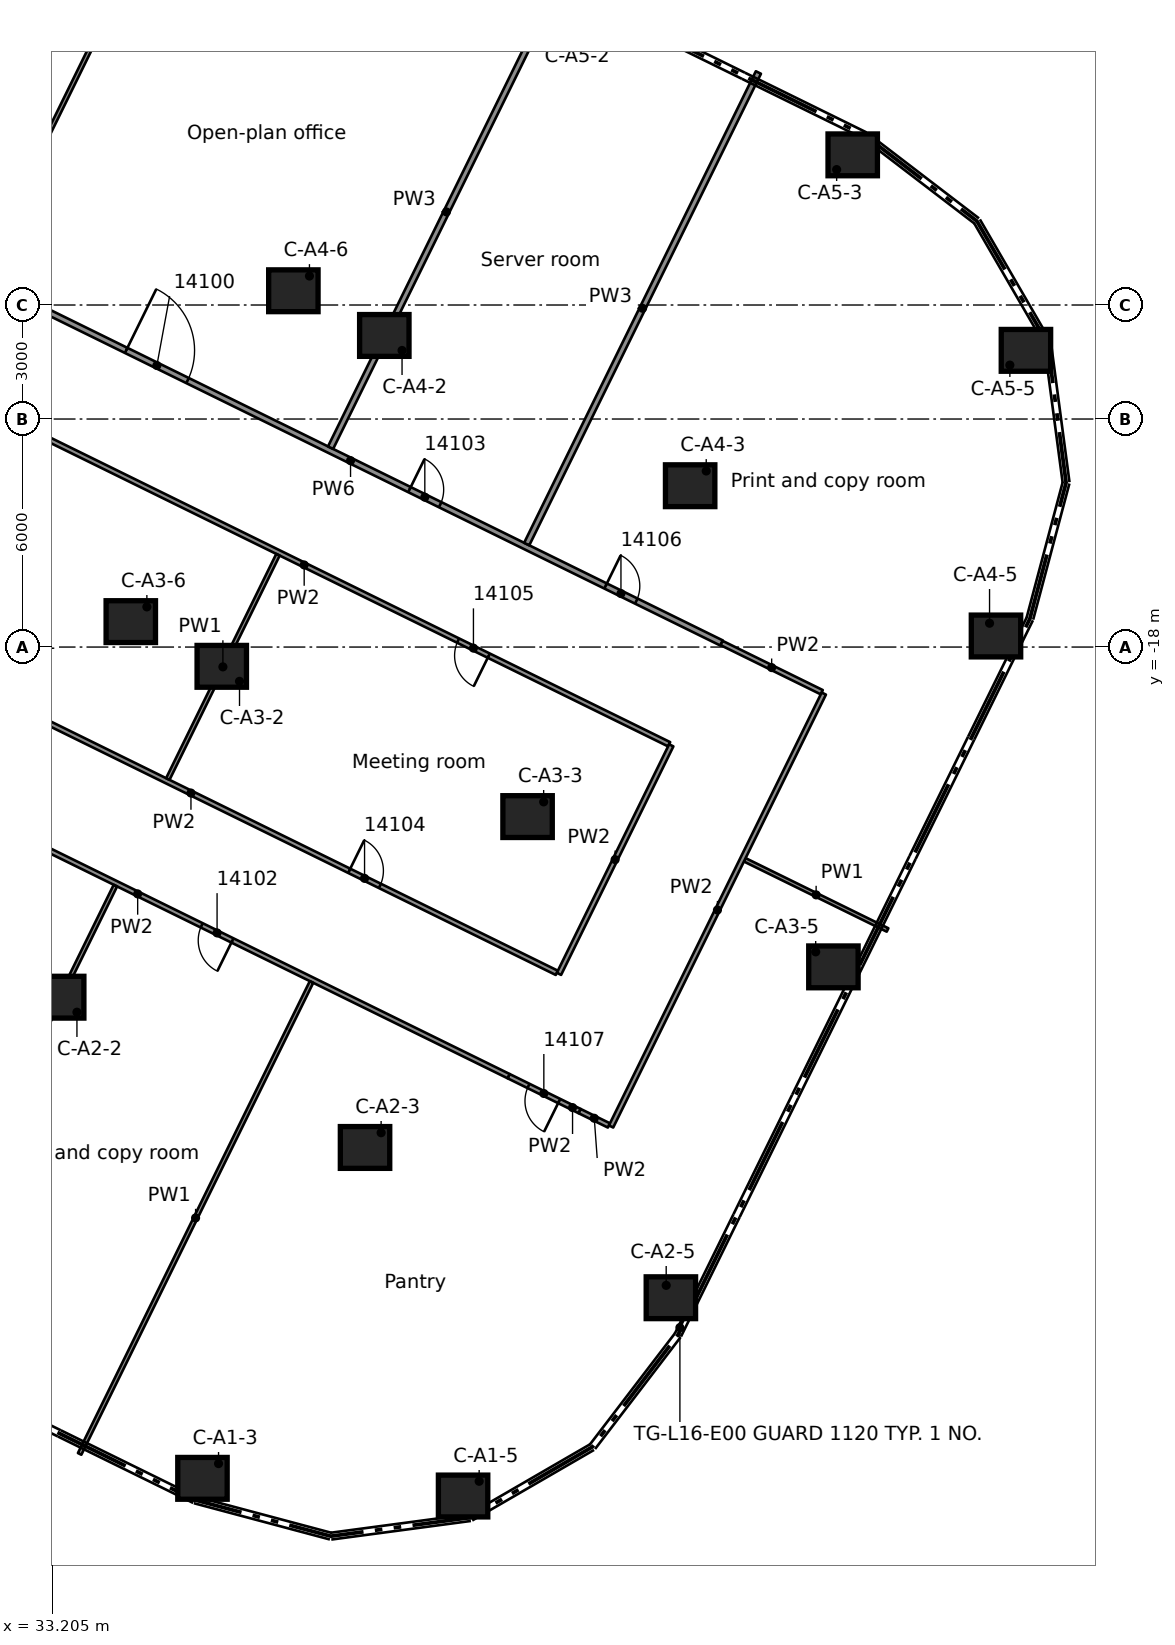
"""IFC4 building model, lengths in metres.
Left out: names, types, materials, properties, quantities, classifications, styles, units other than length and angle.
Written with IfcOpenShell. Run it as: python <this file> out.ifc"""

import sys

from ifc_helpers import new_model, si_unit, direction, frame, frame_2d, origin, origin_2d, place, context, subcontext, project, spatial, rectangle, extrude, element, fill, save


model = new_model("IFC4")
c1 = context("Model", 3, precision=1e-05, world=origin(), true_north=direction((0.0, 1.0)))
c2 = subcontext(c1, "Body", "Model", "MODEL_VIEW")
j1 = project(units=[si_unit("LENGTHUNIT", "METRE"), si_unit("PLANEANGLEUNIT", "RADIAN")], contexts=[c1])
p1 = place(None, origin())
s1 = spatial("IfcSite", under=j1, at=p1, CompositionType="ELEMENT")
p2 = place(p1, origin())
s2 = spatial("IfcBuilding", under=s1, at=p2, CompositionType="ELEMENT")
p3 = place(p2, frame((0.0, 0.0, 69.3)))
s3 = spatial("IfcBuildingStorey", under=s2, at=p3, CompositionType="ELEMENT", Elevation=69.3)
for number, where, z_axis, x_axis in (
    (1, (37.158, -39.873, 0.0), (0.0, 0.0, 1.0), (1.0, 0.0, 0.0)),
    (2, (44.016, -40.338, 0.0), (0.0, 0.0, 1.0), (1.0, 0.0, 0.0)),
    (3, (33.388, -27.213, 0.0), (0.0, 0.0, 1.0), (1.0, 0.0, 0.0)),
    (4, (41.436, -31.167, 0.0), (0.0, 0.0, 1.0), (1.0, 0.0, 0.0)),
    (5, (49.484, -35.121, 0.0), (0.0, 0.0, 1.0), (1.0, 0.0, 0.0)),
    (6, (37.666, -18.507, 0.0), (0.0, 0.0, 1.0), (1.0, 0.0, 0.0)),
    (7, (45.713, -22.461, 0.0), (0.0, 0.0, 1.0), (1.0, 0.0, 0.0)),
    (8, (53.761, -26.415, 0.0), (0.0, 0.0, 1.0), (1.0, 0.0, 0.0)),
    (9, (35.272, -17.331, 0.0), (0.0, 0.0, 1.0), (1.0, 0.0, 0.0)),
    (10, (41.943, -9.801, 0.0), (0.0, 0.0, 1.0), (1.0, 0.0, 0.0)),
    (11, (49.991, -13.755, 0.0), (0.0, 0.0, 1.0), (1.0, 0.0, 0.0)),
    (12, (58.039, -17.709, 0.0), (0.0, 0.0, 1.0), (1.0, 0.0, 0.0)),
    (13, (39.55, -8.625, 0.0), (0.0, 0.0, 1.0), (1.0, 0.0, 0.0)),
    (14, (54.269, -5.049, 0.0), (0.0, 0.0, 1.0), (1.0, 0.0, 0.0)),
    (15, (58.827, -10.193, 0.0), (0.0, 0.0, 1.0), (1.0, 0.0, 0.0)),
):
    element("IfcColumn", number, at=place(p3, frame(where, z_axis=z_axis, x_axis=x_axis)), inside=s3, PredefinedType="COLUMN", context=c2, shape_type="SweptSolid", body=[
        extrude(rectangle(XDim=1.3, YDim=1.1, at=origin_2d()), origin(), (0.0, 0.0, 1.0), 3.5),
    ])
p4 = place(p3, frame((45.217, -29.292, 0.0), z_axis=(0.0, 0.0, 1.0), x_axis=(-0.897531499345, 0.440950346053, 0.0)))
e16 = element("IfcWall", 16, at=p4, inside=s3, PredefinedType="PARTITIONING", context=c2, shape_type="SweptSolid", body=[
    extrude(rectangle(XDim=21.758, YDim=0.125, at=frame_2d((10.879, 0.0))), origin(), (0.0, 0.0, 1.0), 3.03),
])
p5 = place(p4, frame((8.101, 0.0, 0.0)))
e17 = element("IfcOpeningElement", 17, at=p5, cuts=e16, PredefinedType="OPENING", context=c2, shape_type="SweptSolid", body=[
    extrude(rectangle(XDim=0.9, YDim=2.1, at=frame_2d((0.45, 1.05))), frame((0.0, 0.073, 0.0), z_axis=(0.0, -1.0, 0.0), x_axis=(1.0, 0.0, 0.0)), (0.0, 0.0, 1.0), 0.145),
])
p6 = place(p4, frame((16.101, 0.0, 0.0)))
e18 = element("IfcOpeningElement", 18, at=p6, cuts=e16, PredefinedType="OPENING", context=c2, shape_type="SweptSolid", body=[
    extrude(rectangle(XDim=0.9, YDim=2.1, at=frame_2d((0.45, 1.05))), frame((0.0, 0.073, 0.0), z_axis=(0.0, -1.0, 0.0), x_axis=(1.0, 0.0, 0.0)), (0.0, 0.0, 1.0), 0.145),
])
p7 = place(p3, frame((47.083, -30.21, 0.0), z_axis=(0.0, 0.0, 1.0), x_axis=(-0.897296606975, 0.44142813584, 0.0)))
e19 = element("IfcWall", 19, at=p7, inside=s3, PredefinedType="PARTITIONING", context=c2, shape_type="SweptSolid", body=[
    extrude(rectangle(XDim=2.08, YDim=0.125, at=frame_2d((1.04, 0.0))), origin(), (0.0, 0.0, 1.0), 3.03),
])
p8 = place(p7, frame((0.6, 0.0, 0.0)))
e20 = element("IfcOpeningElement", 20, at=p8, cuts=e19, PredefinedType="OPENING", context=c2, shape_type="SweptSolid", body=[
    extrude(rectangle(XDim=0.9, YDim=2.1, at=frame_2d((0.45, 1.05))), frame((0.0, 0.073, 0.0), z_axis=(0.0, -1.0, 0.0), x_axis=(1.0, 0.0, 0.0)), (0.0, 0.0, 1.0), 0.145),
])
p9 = place(p3, frame((27.228, -17.11, 0.0), z_axis=(0.0, 0.0, 1.0), x_axis=(0.897483206538, -0.441048629952, 0.0)))
e21 = element("IfcWall", 21, at=p9, inside=s3, PredefinedType="PARTITIONING", context=c2, shape_type="SweptSolid", body=[
    extrude(rectangle(XDim=21.453, YDim=0.125, at=frame_2d((10.727, 0.0))), origin(), (0.0, 0.0, 1.0), 3.03),
])
p10 = place(p9, frame((4.518, 0.0, 0.0)))
e22 = element("IfcOpeningElement", 22, at=p10, cuts=e21, PredefinedType="OPENING", context=c2, shape_type="SweptSolid", body=[
    extrude(rectangle(XDim=0.9, YDim=2.1, at=frame_2d((0.45, 1.05))), frame((0.0, 0.073, 0.0), z_axis=(0.0, -1.0, 0.0), x_axis=(1.0, 0.0, 0.0)), (0.0, 0.0, 1.0), 0.145),
])
p11 = place(p9, frame((15.367, 0.0, 0.0)))
e23 = element("IfcOpeningElement", 23, at=p11, cuts=e21, PredefinedType="OPENING", context=c2, shape_type="SweptSolid", body=[
    extrude(rectangle(XDim=0.9, YDim=2.1, at=frame_2d((0.45, 1.05))), frame((0.0, 0.073, 0.0), z_axis=(0.0, -1.0, 0.0), x_axis=(1.0, 0.0, 0.0)), (0.0, 0.0, 1.0), 0.145),
])
p12 = place(p3, frame((51.427, -23.598, 0.0), z_axis=(0.0, 0.0, 1.0), x_axis=(0.897542181512, -0.44092860239, 0.0)))
e24 = element("IfcWall", 24, at=p12, inside=s3, PredefinedType="PARTITIONING", context=c2, shape_type="SweptSolid", body=[
    extrude(rectangle(XDim=4.187, YDim=0.1, at=frame_2d((2.094, 0.0))), origin(), (0.0, 0.0, 1.0), 3.03),
])
p13 = place(p3, frame((49.438, -20.558, 0.0), z_axis=(0.0, 0.0, 1.0), x_axis=(-0.897535791299, 0.440941609896, 0.0)))
e25 = element("IfcWall", 25, at=p13, inside=s3, PredefinedType="PARTITIONING", context=c2, shape_type="SweptSolid", body=[
    extrude(rectangle(XDim=21.4, YDim=0.125, at=frame_2d((10.7, 0.0))), origin(), (0.0, 0.0, 1.0), 3.03),
])
p14 = place(p13, frame((5.288, 0.0, 0.0)))
e26 = element("IfcOpeningElement", 26, at=p14, cuts=e25, PredefinedType="OPENING", context=c2, shape_type="SweptSolid", body=[
    extrude(rectangle(XDim=0.9, YDim=2.1, at=frame_2d((0.45, 1.05))), frame((0.0, 0.073, 0.0), z_axis=(0.0, -1.0, 0.0), x_axis=(1.0, 0.0, 0.0)), (0.0, 0.0, 1.0), 0.145),
])
p15 = place(p3, frame((31.291, -8.298, 0.0), z_axis=(0.0, 0.0, 1.0), x_axis=(0.897505006542, -0.441004266683, 0.0)))
e27 = element("IfcWall", 27, at=p15, inside=s3, PredefinedType="PARTITIONING", context=c2, shape_type="SweptSolid", body=[
    extrude(rectangle(XDim=21.757, YDim=0.15, at=frame_2d((10.878, 0.0))), origin(), (0.0, 0.0, 1.0), 3.03),
])
p16 = place(p15, frame((4.3, 0.0, 0.0)))
e28 = element("IfcOpeningElement", 28, at=p16, cuts=e27, PredefinedType="OPENING", context=c2, shape_type="SweptSolid", body=[
    extrude(rectangle(XDim=1.8, YDim=2.1, at=frame_2d((0.9, 1.05))), frame((0.0, 0.085, 0.0), z_axis=(0.0, -1.0, 0.0), x_axis=(1.0, 0.0, 0.0)), (0.0, 0.0, 1.0), 0.17),
])
p17 = place(p15, frame((12.606, 0.0, 0.0)))
e29 = element("IfcOpeningElement", 29, at=p17, cuts=e27, PredefinedType="OPENING", context=c2, shape_type="SweptSolid", body=[
    extrude(rectangle(XDim=0.9, YDim=2.1, at=frame_2d((0.45, 1.05))), frame((0.0, 0.085, 0.0), z_axis=(0.0, -1.0, 0.0), x_axis=(1.0, 0.0, 0.0)), (0.0, 0.0, 1.0), 0.17),
])
p18 = place(p15, frame((18.357, 0.0, 0.0)))
e30 = element("IfcOpeningElement", 30, at=p18, cuts=e27, PredefinedType="OPENING", context=c2, shape_type="SweptSolid", body=[
    extrude(rectangle(XDim=0.9, YDim=2.1, at=frame_2d((0.45, 1.05))), frame((0.0, 0.085, 0.0), z_axis=(0.0, -1.0, 0.0), x_axis=(1.0, 0.0, 0.0)), (0.0, 0.0, 1.0), 0.17),
])
p19 = place(p3, frame((53.454, -19.188, 0.0), z_axis=(0.0, 0.0, 1.0), x_axis=(-0.8975474006, 0.4409179784, 0.0)))
e31 = element("IfcWall", 31, at=p19, inside=s3, PredefinedType="PARTITIONING", context=c2, shape_type="SweptSolid", body=[
    extrude(rectangle(XDim=2.937, YDim=0.125, at=frame_2d((1.468, 0.0))), origin(), (0.0, 0.0, 1.0), 3.03),
])
p20 = place(p3, frame((47.083, -30.21, 0.0), z_axis=(0.0, 0.0, 1.0), x_axis=(0.898154517821, -0.43967995419, 0.0)))
e32 = element("IfcWall", 32, at=p20, inside=s3, PredefinedType="PARTITIONING", context=c2, shape_type="SweptSolid", body=[
    extrude(rectangle(XDim=0.857, YDim=0.125, at=frame_2d((0.429, 0.0))), origin(), (0.0, 0.0, 1.0), 3.03),
])
p21 = place(p3, frame((47.91, -30.615, 0.0), z_axis=(0.0, 0.0, 1.0), x_axis=(0.441070796209, 0.897472313072, 0.0)))
e33 = element("IfcWall", 33, at=p21, inside=s3, PredefinedType="PARTITIONING", context=c2, shape_type="SweptSolid", body=[
    extrude(rectangle(XDim=12.692, YDim=0.125, at=frame_2d((6.346, 0.0))), origin(), (0.0, 0.0, 1.0), 3.03),
])
p22 = place(p3, frame((46.539, -26.599, 0.0), z_axis=(0.0, 0.0, 1.0), x_axis=(0.441022842823, 0.897495878603, 0.0)))
e34 = element("IfcWall", 34, at=p22, inside=s3, PredefinedType="PARTITIONING", context=c2, shape_type="SweptSolid", body=[
    extrude(rectangle(XDim=6.7, YDim=0.125, at=frame_2d((3.35, 0.0))), origin(), (0.0, 0.0, 1.0), 3.03),
])
p23 = place(p3, frame((33.926, -39.23, 0.0), z_axis=(0.0, 0.0, 1.0), x_axis=(0.441020089077, 0.897497231768, 0.0)))
e35 = element("IfcWall", 35, at=p23, inside=s3, PredefinedType="PARTITIONING", context=c2, shape_type="SweptSolid", body=[
    extrude(rectangle(XDim=13.836, YDim=0.1, at=frame_2d((6.918, 0.0))), origin(), (0.0, 0.0, 1.0), 3.03),
])
p24 = place(p3, frame((45.69, -15.29, 0.0), z_axis=(0.0, 0.0, 1.0), x_axis=(0.441022179243, 0.89749620468, 0.0)))
e36 = element("IfcWall", 36, at=p24, inside=s3, PredefinedType="PARTITIONING", context=c2, shape_type="SweptSolid", body=[
    extrude(rectangle(XDim=13.825, YDim=0.15, at=frame_2d((6.913, 0.0))), origin(), (0.0, 0.0, 1.0), 2.395),
])
p25 = place(p3, frame((28.766, -36.695, 0.0), z_axis=(0.0, 0.0, 1.0), x_axis=(0.440949019424, 0.897532151106, 0.0)))
e37 = element("IfcWall", 37, at=p25, inside=s3, PredefinedType="PARTITIONING", context=c2, shape_type="SweptSolid", body=[
    extrude(rectangle(XDim=13.836, YDim=0.1, at=frame_2d((6.918, 0.0))), origin(), (0.0, 0.0, 1.0), 3.03),
])
p26 = place(p3, frame((36.246, -21.472, 0.0), z_axis=(0.0, 0.0, 1.0), x_axis=(0.440934319879, 0.897539372703, 0.0)))
e38 = element("IfcWall", 38, at=p26, inside=s3, PredefinedType="PARTITIONING", context=c2, shape_type="SweptSolid", body=[
    extrude(rectangle(XDim=6.574, YDim=0.1, at=frame_2d((3.287, 0.0))), origin(), (0.0, 0.0, 1.0), 3.03),
])
p27 = place(p3, frame((40.529, -12.754, 0.0), z_axis=(0.0, 0.0, 1.0), x_axis=(0.441035914892, 0.897489454966, 0.0)))
e39 = element("IfcWall", 39, at=p27, inside=s3, PredefinedType="PARTITIONING", context=c2, shape_type="SweptSolid", body=[
    extrude(rectangle(XDim=13.824, YDim=0.15, at=frame_2d((6.912, 0.0))), origin(), (0.0, 0.0, 1.0), 2.395),
])
p28 = place(p3, frame((31.246, -8.276, 0.0), z_axis=(0.0, 0.0, 1.0), x_axis=(0.440984317846, 0.897514808465, 0.0)))
e40 = element("IfcWall", 40, at=p28, inside=s3, PredefinedType="PARTITIONING", context=c2, shape_type="SweptSolid", body=[
    extrude(rectangle(XDim=13.898, YDim=0.1, at=frame_2d((6.949, 0.0))), origin(), (0.0, 0.0, 1.0), 2.419),
])
p29 = place(p16, origin())
e41 = element("IfcDoor", 41, at=p29, inside=s3, OperationType="DOUBLE_DOOR_SINGLE_SWING", PredefinedType="DOOR", context=c2, shape_type="SweptSolid", body=[
    extrude(rectangle(XDim=1.8, YDim=2.1, at=frame_2d((0.9, 1.05))), frame((0.0, 0.025, 0.0), z_axis=(0.0, -1.0, 0.0), x_axis=(1.0, 0.0, 0.0)), (0.0, 0.0, 1.0), 0.05),
])
fill(e28, e41)
p30 = place(p5, origin())
e42 = element("IfcDoor", 42, at=p30, inside=s3, OperationType="SINGLE_SWING_LEFT", PredefinedType="DOOR", context=c2, shape_type="SweptSolid", body=[
    extrude(rectangle(XDim=0.9, YDim=2.1, at=frame_2d((0.45, 1.05))), frame((0.0, 0.025, 0.0), z_axis=(0.0, -1.0, 0.0), x_axis=(1.0, 0.0, 0.0)), (0.0, 0.0, 1.0), 0.05),
])
fill(e17, e42)
p31 = place(p17, origin())
e43 = element("IfcDoor", 43, at=p31, inside=s3, OperationType="SINGLE_SWING_RIGHT", PredefinedType="DOOR", context=c2, shape_type="SweptSolid", body=[
    extrude(rectangle(XDim=0.9, YDim=2.1, at=frame_2d((0.45, 1.05))), frame((0.0, 0.025, 0.0), z_axis=(0.0, -1.0, 0.0), x_axis=(1.0, 0.0, 0.0)), (0.0, 0.0, 1.0), 0.05),
])
fill(e29, e43)
p32 = place(p11, origin())
e44 = element("IfcDoor", 44, at=p32, inside=s3, OperationType="SINGLE_SWING_RIGHT", PredefinedType="DOOR", context=c2, shape_type="SweptSolid", body=[
    extrude(rectangle(XDim=0.9, YDim=2.1, at=frame_2d((0.45, 1.05))), frame((0.0, 0.025, 0.0), z_axis=(0.0, -1.0, 0.0), x_axis=(1.0, 0.0, 0.0)), (0.0, 0.0, 1.0), 0.05),
])
fill(e23, e44)
p33 = place(p14, origin())
e45 = element("IfcDoor", 45, at=p33, inside=s3, OperationType="SINGLE_SWING_LEFT", PredefinedType="DOOR", context=c2, shape_type="SweptSolid", body=[
    extrude(rectangle(XDim=0.9, YDim=2.1, at=frame_2d((0.45, 1.05))), frame((0.0, 0.025, 0.0), z_axis=(0.0, -1.0, 0.0), x_axis=(1.0, 0.0, 0.0)), (0.0, 0.0, 1.0), 0.05),
])
fill(e26, e45)
p34 = place(p18, origin())
e46 = element("IfcDoor", 46, at=p34, inside=s3, OperationType="SINGLE_SWING_RIGHT", PredefinedType="DOOR", context=c2, shape_type="SweptSolid", body=[
    extrude(rectangle(XDim=0.9, YDim=2.1, at=frame_2d((0.45, 1.05))), frame((0.0, 0.025, 0.0), z_axis=(0.0, -1.0, 0.0), x_axis=(1.0, 0.0, 0.0)), (0.0, 0.0, 1.0), 0.05),
])
fill(e30, e46)
p35 = place(p8, origin())
e47 = element("IfcDoor", 47, at=p35, inside=s3, OperationType="SINGLE_SWING_RIGHT", PredefinedType="DOOR", context=c2, shape_type="SweptSolid", body=[
    extrude(rectangle(XDim=0.9, YDim=2.1, at=frame_2d((0.45, 1.05))), frame((0.0, 0.025, 0.0), z_axis=(0.0, -1.0, 0.0), x_axis=(1.0, 0.0, 0.0)), (0.0, 0.0, 1.0), 0.05),
])
fill(e20, e47)
save(model, sys.argv[1])
